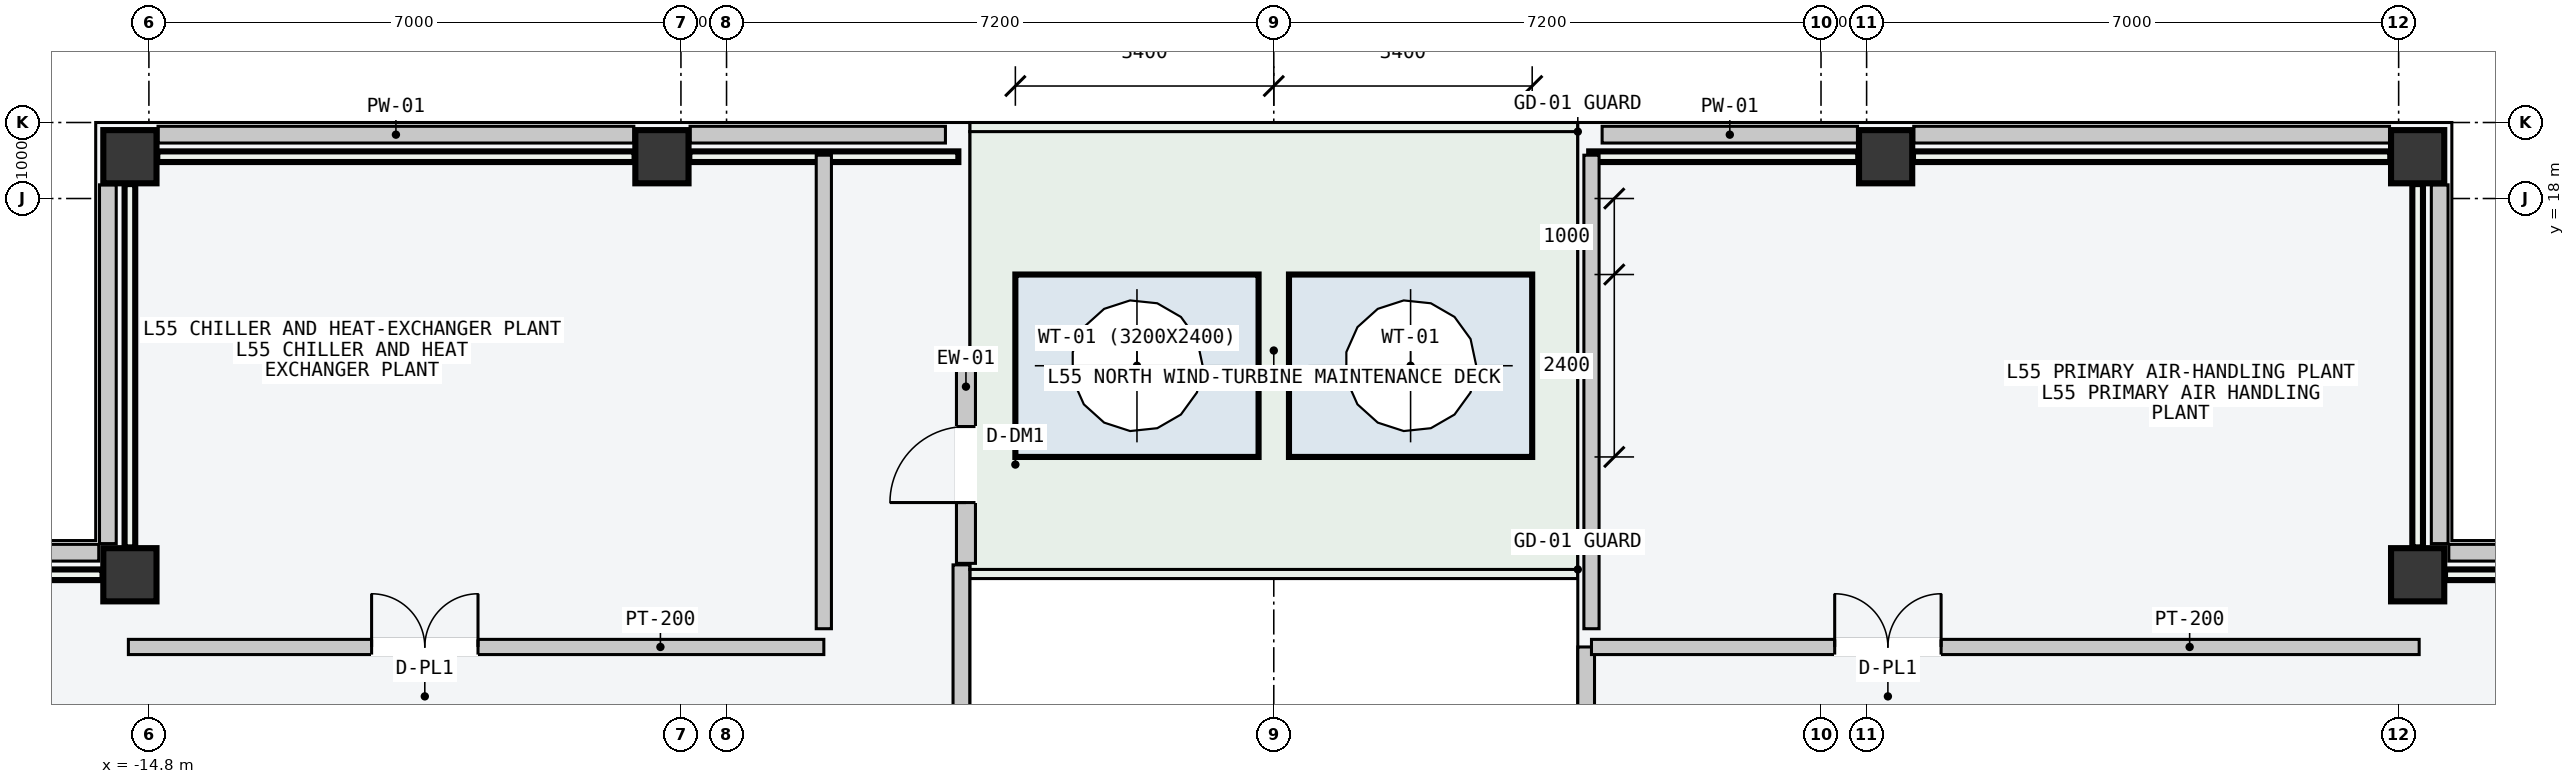
"""IFC4 building model, lengths in metres.
Left out: names, types, materials, properties, quantities, classifications, styles, units other than length and angle.
Written with IfcOpenShell. Run it as: python <this file> out.ifc"""

import sys

from ifc_helpers import new_model, si_unit, direction, frame, frame_2d, origin, origin_2d, place, context, subcontext, project, spatial, rectangle, hollow_rectangle, extrude, element, fill, save


model = new_model("IFC4")
c1 = context("Model", 3, precision=1e-05, world=origin(), true_north=direction((0.0, 1.0)))
c2 = subcontext(c1, "Body", "Model", "MODEL_VIEW")
j1 = project(units=[si_unit("LENGTHUNIT", "METRE"), si_unit("PLANEANGLEUNIT", "RADIAN")], contexts=[c1])
p1 = place(None, origin())
s1 = spatial("IfcSite", under=j1, at=p1, CompositionType="ELEMENT")
p2 = place(p1, origin())
s2 = spatial("IfcBuilding", under=s1, at=p2, CompositionType="ELEMENT")
p3 = place(p2, frame((0.0, 0.0, 209.1)))
s3 = spatial("IfcBuildingStorey", under=s2, at=p3, CompositionType="ELEMENT", Elevation=209.1)
for number, where, z_axis, x_axis in (
    (1, (-15.05, 18.55, 0.0), (0.0, 0.0, 1.0), (1.0, 0.0, 0.0)),
    (2, (-8.05, 18.55, 0.0), (0.0, 0.0, 1.0), (1.0, 0.0, 0.0)),
    (3, (8.05, 18.55, 0.0), (0.0, 0.0, 1.0), (1.0, 0.0, 0.0)),
    (4, (15.05, 18.55, 0.0), (0.0, 0.0, 1.0), (1.0, 0.0, 0.0)),
    (5, (-15.05, 13.05, 0.0), (0.0, 0.0, 1.0), (1.0, 0.0, 0.0)),
    (6, (15.05, 13.05, 0.0), (0.0, 0.0, 1.0), (1.0, 0.0, 0.0)),
):
    element("IfcColumn", number, at=place(p3, frame(where, z_axis=z_axis, x_axis=x_axis)), inside=s3, PredefinedType="COLUMN", context=c2, shape_type="SweptSolid", body=[
        extrude(hollow_rectangle(XDim=0.7, YDim=0.7, WallThickness=0.03, at=origin_2d()), origin(), (0.0, 0.0, 1.0), 4.8),
    ])
p4 = place(p3, frame((-14.68, 18.84, 0.0), z_axis=(0.0, 0.0, 1.0), x_axis=(1.0, 0.0, 0.0)))
e7 = element("IfcWall", 7, at=p4, inside=s3, PredefinedType="PARAPET", context=c2, shape_type="SweptSolid", body=[
    extrude(rectangle(XDim=6.26, YDim=0.22, at=frame_2d((3.13, 0.0))), origin(), (0.0, 0.0, 1.0), 1.2),
])
for number, where, z_axis, x_axis in (
    (8, (-7.68, 18.84, 0.0), (0.0, 0.0, 1.0), (1.0, 0.0, 0.0)),
    (9, (4.32, 18.84, 0.0), (0.0, 0.0, 1.0), (1.0, 0.0, 0.0)),
):
    element("IfcWall", number, at=place(p3, frame(where, z_axis=z_axis, x_axis=x_axis)), inside=s3, PredefinedType="PARAPET", context=c2, shape_type="SweptSolid", body=[
        extrude(rectangle(XDim=3.36, YDim=0.22, at=frame_2d((1.68, 0.0))), origin(), (0.0, 0.0, 1.0), 1.2),
    ])
p5 = place(p3, frame((8.42, 18.84, 0.0), z_axis=(0.0, 0.0, 1.0), x_axis=(1.0, 0.0, 0.0)))
e10 = element("IfcWall", 10, at=p5, inside=s3, PredefinedType="PARAPET", context=c2, shape_type="SweptSolid", body=[
    extrude(rectangle(XDim=6.26, YDim=0.22, at=frame_2d((3.13, 0.0))), origin(), (0.0, 0.0, 1.0), 1.2),
])
for number, where, z_axis, x_axis in (
    (11, (-15.34, 13.46, 0.0), (0.0, 0.0, 1.0), (0.0, 1.0, 0.0)),
    (12, (-20.18, 13.34, 0.0), (0.0, 0.0, 1.0), (1.0, 0.0, 0.0)),
    (13, (15.34, 13.46, 0.0), (0.0, 0.0, 1.0), (0.0, 1.0, 0.0)),
    (14, (15.46, 13.34, 0.0), (0.0, 0.0, 1.0), (1.0, 0.0, 0.0)),
):
    element("IfcWall", number, at=place(p3, frame(where, z_axis=z_axis, x_axis=x_axis)), inside=s3, PredefinedType="PARAPET", context=c2, shape_type="SweptSolid", body=[
        extrude(rectangle(XDim=4.72, YDim=0.22, at=frame_2d((2.36, 0.0))), origin(), (0.0, 0.0, 1.0), 1.2),
    ])
p6 = place(p3, frame((-4.11, -13.18, 0.0), z_axis=(0.0, 0.0, 1.0), x_axis=(0.0, 1.0, 0.0)))
e15 = element("IfcWall", 15, at=p6, inside=s3, PredefinedType="PARAPET", context=c2, shape_type="SweptSolid", body=[
    extrude(rectangle(XDim=26.36, YDim=0.22, at=frame_2d((13.18, 0.0))), origin(), (0.0, 0.0, 1.0), 1.2),
])
p7 = place(p3, frame((4.11, -12.1, 0.0), z_axis=(0.0, 0.0, 1.0), x_axis=(0.0, 1.0, 0.0)))
e16 = element("IfcWall", 16, at=p7, inside=s3, PredefinedType="PARAPET", context=c2, shape_type="SweptSolid", body=[
    extrude(rectangle(XDim=24.2, YDim=0.22, at=frame_2d((12.1, 0.0))), origin(), (0.0, 0.0, 1.0), 1.2),
])
p8 = place(p3, frame((-4.05, 13.2, 0.0), z_axis=(0.0, 0.0, 1.0), x_axis=(0.0, 1.0, 0.0)))
e17 = element("IfcWall", 17, at=p8, inside=s3, PredefinedType="STANDARD", context=c2, shape_type="SweptSolid", body=[
    extrude(rectangle(XDim=2.6, YDim=0.25, at=frame_2d((1.3, 0.0))), origin(), (0.0, 0.0, 1.0), 4.6),
])
p9 = place(p8, frame((0.8, 0.0, 0.0)))
e18 = element("IfcOpeningElement", 18, at=p9, cuts=e17, PredefinedType="OPENING", context=c2, shape_type="SweptSolid", body=[
    extrude(rectangle(XDim=1.0, YDim=2.15, at=frame_2d((0.5, 1.075))), frame((0.0, 0.135, 0.0), z_axis=(0.0, -1.0, 0.0), x_axis=(1.0, 0.0, 0.0)), (0.0, 0.0, 1.0), 0.27),
])
p10 = place(p3, frame((-15.07, 12.1, 0.0), z_axis=(0.0, 0.0, 1.0), x_axis=(1.0, 0.0, 0.0)))
e19 = element("IfcWall", 19, at=p10, inside=s3, PredefinedType="PARTITIONING", context=c2, shape_type="SweptSolid", body=[
    extrude(rectangle(XDim=9.15, YDim=0.2, at=frame_2d((4.575, 0.0))), origin(), (0.0, 0.0, 1.0), 4.6),
])
p11 = place(p10, frame((3.2, 0.0, 0.0)))
e20 = element("IfcOpeningElement", 20, at=p11, cuts=e19, PredefinedType="OPENING", context=c2, shape_type="SweptSolid", body=[
    extrude(rectangle(XDim=1.4, YDim=2.25, at=frame_2d((0.7, 1.125))), frame((0.0, 0.11, 0.0), z_axis=(0.0, -1.0, 0.0), x_axis=(1.0, 0.0, 0.0)), (0.0, 0.0, 1.0), 0.22),
])
p12 = place(p3, frame((-5.92, 12.34, 0.0), z_axis=(0.0, 0.0, 1.0), x_axis=(0.0, 1.0, 0.0)))
e21 = element("IfcWall", 21, at=p12, inside=s3, PredefinedType="PARTITIONING", context=c2, shape_type="SweptSolid", body=[
    extrude(rectangle(XDim=6.23, YDim=0.2, at=frame_2d((3.115, 0.0))), origin(), (0.0, 0.0, 1.0), 4.6),
])
p13 = place(p3, frame((4.18, 12.1, 0.0), z_axis=(0.0, 0.0, 1.0), x_axis=(1.0, 0.0, 0.0)))
e22 = element("IfcWall", 22, at=p13, inside=s3, PredefinedType="PARTITIONING", context=c2, shape_type="SweptSolid", body=[
    extrude(rectangle(XDim=10.89, YDim=0.2, at=frame_2d((5.445, 0.0))), origin(), (0.0, 0.0, 1.0), 4.6),
])
p14 = place(p13, frame((3.2, 0.0, 0.0)))
e23 = element("IfcOpeningElement", 23, at=p14, cuts=e22, PredefinedType="OPENING", context=c2, shape_type="SweptSolid", body=[
    extrude(rectangle(XDim=1.4, YDim=2.25, at=frame_2d((0.7, 1.125))), frame((0.0, 0.11, 0.0), z_axis=(0.0, -1.0, 0.0), x_axis=(1.0, 0.0, 0.0)), (0.0, 0.0, 1.0), 0.22),
])
p15 = place(p3, frame((4.18, 12.34, 0.0), z_axis=(0.0, 0.0, 1.0), x_axis=(0.0, 1.0, 0.0)))
e24 = element("IfcWall", 24, at=p15, inside=s3, PredefinedType="PARTITIONING", context=c2, shape_type="SweptSolid", body=[
    extrude(rectangle(XDim=6.23, YDim=0.2, at=frame_2d((3.115, 0.0))), origin(), (0.0, 0.0, 1.0), 4.6),
])
p16 = place(p9, origin())
e25 = element("IfcDoor", 25, at=p16, inside=s3, OperationType="SINGLE_SWING_LEFT", PredefinedType="DOOR", context=c2, shape_type="SweptSolid", body=[
    extrude(rectangle(XDim=1.0, YDim=2.15, at=frame_2d((0.5, 1.075))), frame((0.0, 0.025, 0.0), z_axis=(0.0, -1.0, 0.0), x_axis=(1.0, 0.0, 0.0)), (0.0, 0.0, 1.0), 0.05),
])
fill(e18, e25)
p17 = place(p11, origin())
e26 = element("IfcDoor", 26, at=p17, inside=s3, OperationType="DOUBLE_DOOR_SINGLE_SWING", PredefinedType="DOOR", context=c2, shape_type="SweptSolid", body=[
    extrude(rectangle(XDim=1.4, YDim=2.25, at=frame_2d((0.7, 1.125))), frame((0.0, 0.025, 0.0), z_axis=(0.0, -1.0, 0.0), x_axis=(1.0, 0.0, 0.0)), (0.0, 0.0, 1.0), 0.05),
])
fill(e20, e26)
p18 = place(p14, origin())
e27 = element("IfcDoor", 27, at=p18, inside=s3, OperationType="DOUBLE_DOOR_SINGLE_SWING", PredefinedType="DOOR", context=c2, shape_type="SweptSolid", body=[
    extrude(rectangle(XDim=1.4, YDim=2.25, at=frame_2d((0.7, 1.125))), frame((0.0, 0.025, 0.0), z_axis=(0.0, -1.0, 0.0), x_axis=(1.0, 0.0, 0.0)), (0.0, 0.0, 1.0), 0.05),
])
fill(e23, e27)
save(model, sys.argv[1])
